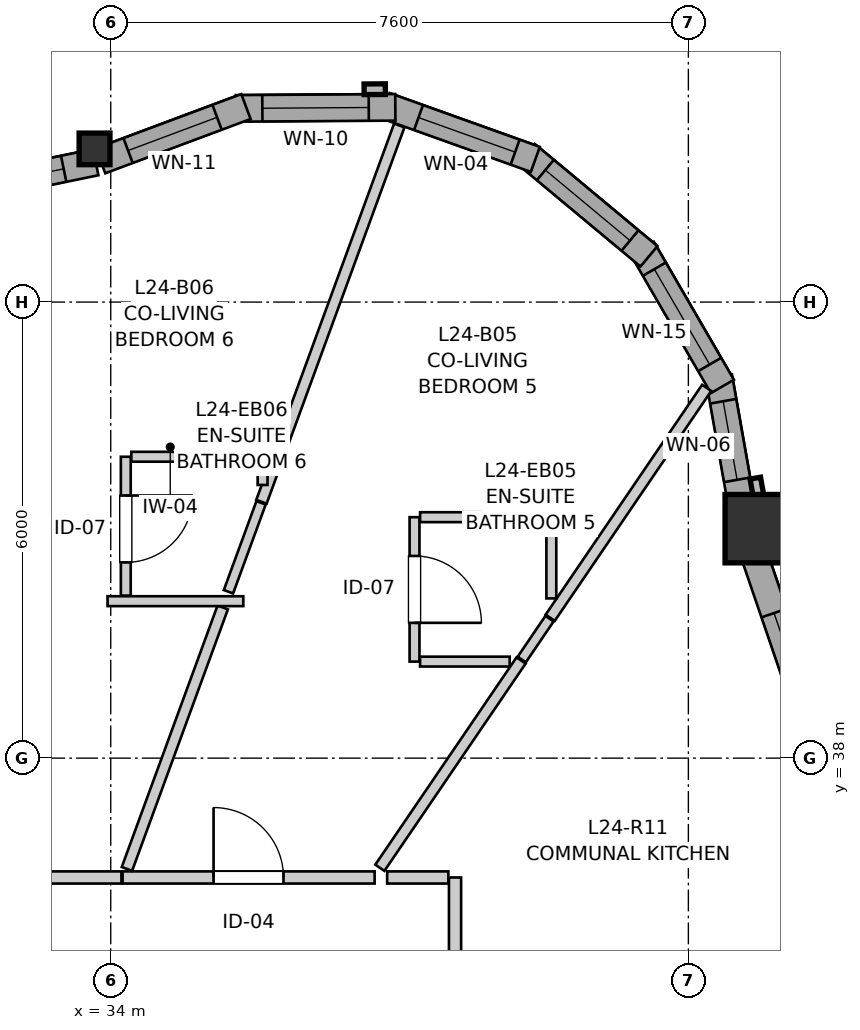
"""IFC4 building model, lengths in metres.
Left out: names, types, materials, properties, quantities, classifications, styles, units other than length and angle.
Written with IfcOpenShell. Run it as: python <this file> out.ifc"""

import sys

from ifc_helpers import new_model, si_unit, direction, frame, frame_2d, origin, origin_2d, place, context, subcontext, project, spatial, rectangle, i_section, extrude, source, transform, mapped, element, fill, save


model = new_model("IFC4")
c1 = context("Model", 3, precision=1e-05, world=origin(), true_north=direction((0.0, 1.0)))
c2 = subcontext(c1, "Body", "Model", "MODEL_VIEW")
j1 = project(units=[si_unit("LENGTHUNIT", "METRE"), si_unit("PLANEANGLEUNIT", "RADIAN")], contexts=[c1])
p1 = place(None, origin())
s1 = spatial("IfcSite", under=j1, at=p1, CompositionType="ELEMENT")
p2 = place(p1, origin())
s2 = spatial("IfcBuilding", under=s1, at=p2, CompositionType="ELEMENT")
p3 = place(p2, frame((0.0, 0.0, 83.2)))
s3 = spatial("IfcBuildingStorey", under=s2, at=p3, CompositionType="ELEMENT", Elevation=83.2)
m1 = source(origin(), c2, "Body", "SweptSolid", [
    extrude(rectangle(XDim=0.9, YDim=0.9, at=origin_2d()), origin(), (0.0, 0.0, 1.0), 2.935),
])
p4 = place(p3, frame((42.532, 41.019, 0.0), z_axis=(0.0, 0.0, 1.0), x_axis=(1.0, 0.0, 0.0)))
e1 = element("IfcColumn", 1, at=p4, inside=s3, PredefinedType="COLUMN", context=c2, shape_type="MappedRepresentation", body=[
    mapped(m1, transform((0.0, 0.0, 0.0), x_axis=(1.0, 0.0, 0.0), y_axis=(0.0, 1.0, 0.0), z_axis=(0.0, 0.0, 1.0), scale=1.0)),
])
m2 = source(origin(), c2, "Body", "SweptSolid", [
    extrude(i_section(OverallWidth=0.406, OverallDepth=0.416, WebThickness=0.027, FlangeThickness=0.044, FilletRadius=0.015, at=origin_2d()), origin(), (0.0, 0.0, 1.0), 2.935),
])
p5 = place(p3, frame((33.787, 46.015, 0.0), z_axis=(0.0, 0.0, 1.0), x_axis=(1.0, 0.0, 0.0)))
e2 = element("IfcColumn", 2, at=p5, inside=s3, PredefinedType="PILASTER", context=c2, shape_type="MappedRepresentation", body=[
    mapped(m2, transform((0.0, 0.0, 0.0), x_axis=(1.0, 0.0, 0.0), y_axis=(0.0, 1.0, 0.0), z_axis=(0.0, 0.0, 1.0), scale=1.0)),
])
p6 = place(p3, frame((43.406, 37.923, 0.0), z_axis=(0.0, 0.0, 1.0), x_axis=(-0.323597196737, 0.946194934601, 0.0)))
e3 = element("IfcWall", 3, at=p6, inside=s3, PredefinedType="SOLIDWALL", context=c2, shape_type="SweptSolid", body=[
    extrude(rectangle(XDim=2.988, YDim=0.35, at=frame_2d((1.494, 0.0))), origin(), (0.0, 0.0, 1.0), 2.465),
])
p7 = place(p6, frame((0.899, 0.0, 0.82)))
e4 = element("IfcOpeningElement", 4, at=p7, cuts=e3, PredefinedType="OPENING", context=c2, shape_type="SweptSolid", body=[
    extrude(rectangle(XDim=1.2, YDim=1.45, at=frame_2d((0.6, 0.725))), frame((0.0, 0.185, 0.0), z_axis=(0.0, -1.0, 0.0), x_axis=(1.0, 0.0, 0.0)), (0.0, 0.0, 1.0), 0.37),
])
p8 = place(p3, frame((42.321, 41.21, 0.0), z_axis=(0.0, 0.0, 1.0), x_axis=(-0.174331490339, 0.984687022092, 0.0)))
e5 = element("IfcWall", 5, at=p8, inside=s3, PredefinedType="SOLIDWALL", context=c2, shape_type="SweptSolid", body=[
    extrude(rectangle(XDim=1.836, YDim=0.35, at=frame_2d((0.918, 0.0))), origin(), (0.0, 0.0, 1.0), 2.465),
])
p9 = place(p8, frame((0.458, 0.0, 0.82)))
e6 = element("IfcOpeningElement", 6, at=p9, cuts=e5, PredefinedType="OPENING", context=c2, shape_type="SweptSolid", body=[
    extrude(rectangle(XDim=1.05, YDim=1.45, at=frame_2d((0.525, 0.725))), frame((0.0, 0.185, 0.0), z_axis=(0.0, -1.0, 0.0), x_axis=(1.0, 0.0, 0.0)), (0.0, 0.0, 1.0), 0.37),
])
p10 = place(p3, frame((42.047, 42.89, 0.0), z_axis=(0.0, 0.0, 1.0), x_axis=(-0.501902596059, 0.864924149315, 0.0)))
e7 = element("IfcWall", 7, at=p10, inside=s3, PredefinedType="SOLIDWALL", context=c2, shape_type="SweptSolid", body=[
    extrude(rectangle(XDim=2.099, YDim=0.35, at=frame_2d((1.049, 0.0))), origin(), (0.0, 0.0, 1.0), 2.465),
])
p11 = place(p10, frame((0.333, 0.0, 0.82)))
e8 = element("IfcOpeningElement", 8, at=p11, cuts=e7, PredefinedType="OPENING", context=c2, shape_type="SweptSolid", body=[
    extrude(rectangle(XDim=1.45, YDim=1.25, at=frame_2d((0.725, 0.625))), frame((0.0, 0.185, 0.0), z_axis=(0.0, -1.0, 0.0), x_axis=(1.0, 0.0, 0.0)), (0.0, 0.0, 1.0), 0.37),
])
p12 = place(p3, frame((41.082, 44.602, 0.0), z_axis=(0.0, 0.0, 1.0), x_axis=(-0.768497696041, 0.639852554249, 0.0)))
e9 = element("IfcWall", 9, at=p12, inside=s3, PredefinedType="SOLIDWALL", context=c2, shape_type="SweptSolid", body=[
    extrude(rectangle(XDim=2.099, YDim=0.35, at=frame_2d((1.049, 0.0))), origin(), (0.0, 0.0, 1.0), 2.465),
])
p13 = place(p12, frame((0.324, 0.0, 0.82)))
e10 = element("IfcOpeningElement", 10, at=p13, cuts=e9, PredefinedType="OPENING", context=c2, shape_type="SweptSolid", body=[
    extrude(rectangle(XDim=1.45, YDim=1.25, at=frame_2d((0.725, 0.625))), frame((0.0, 0.185, 0.0), z_axis=(0.0, -1.0, 0.0), x_axis=(1.0, 0.0, 0.0)), (0.0, 0.0, 1.0), 0.37),
])
p14 = place(p3, frame((39.586, 45.877, 0.0), z_axis=(0.0, 0.0, 1.0), x_axis=(-0.941473186867, 0.33708787936, 0.0)))
e11 = element("IfcWall", 11, at=p14, inside=s3, PredefinedType="SOLIDWALL", context=c2, shape_type="SweptSolid", body=[
    extrude(rectangle(XDim=2.099, YDim=0.35, at=frame_2d((1.049, 0.0))), origin(), (0.0, 0.0, 1.0), 2.465),
])
p15 = place(p14, frame((0.283, 0.0, 0.82)))
e12 = element("IfcOpeningElement", 12, at=p15, cuts=e11, PredefinedType="OPENING", context=c2, shape_type="SweptSolid", body=[
    extrude(rectangle(XDim=1.35, YDim=1.45, at=frame_2d((0.675, 0.725))), frame((0.0, 0.185, 0.0), z_axis=(0.0, -1.0, 0.0), x_axis=(1.0, 0.0, 0.0)), (0.0, 0.0, 1.0), 0.37),
])
p16 = place(p3, frame((37.744, 46.562, 0.0), z_axis=(0.0, 0.0, 1.0), x_axis=(-0.999976451414, -0.006862697526, 0.0)))
e13 = element("IfcWall", 13, at=p16, inside=s3, PredefinedType="SOLIDWALL", context=c2, shape_type="SweptSolid", body=[
    extrude(rectangle(XDim=2.099, YDim=0.35, at=frame_2d((1.049, 0.0))), origin(), (0.0, 0.0, 1.0), 2.465),
])
p17 = place(p16, frame((0.35, 0.0, 0.82)))
e14 = element("IfcOpeningElement", 14, at=p17, cuts=e13, PredefinedType="OPENING", context=c2, shape_type="SweptSolid", body=[
    extrude(rectangle(XDim=1.4, YDim=1.35, at=frame_2d((0.7, 0.675))), frame((0.0, 0.185, 0.0), z_axis=(0.0, -1.0, 0.0), x_axis=(1.0, 0.0, 0.0)), (0.0, 0.0, 1.0), 0.37),
])
p18 = place(p3, frame((35.779, 46.573, 0.0), z_axis=(0.0, 0.0, 1.0), x_axis=(-0.9368002254, -0.349864741994, 0.0)))
e15 = element("IfcWall", 15, at=p18, inside=s3, PredefinedType="SOLIDWALL", context=c2, shape_type="SweptSolid", body=[
    extrude(rectangle(XDim=2.041, YDim=0.35, at=frame_2d((1.021, 0.0))), origin(), (0.0, 0.0, 1.0), 2.465),
])
p19 = place(p18, frame((0.406, 0.0, 0.82)))
e16 = element("IfcOpeningElement", 16, at=p19, cuts=e15, PredefinedType="OPENING", context=c2, shape_type="SweptSolid", body=[
    extrude(rectangle(XDim=1.25, YDim=1.35, at=frame_2d((0.625, 0.675))), frame((0.0, 0.185, 0.0), z_axis=(0.0, -1.0, 0.0), x_axis=(1.0, 0.0, 0.0)), (0.0, 0.0, 1.0), 0.37),
])
p20 = place(p3, frame((33.803, 45.84, 0.0), z_axis=(0.0, 0.0, 1.0), x_axis=(-0.97943222174, -0.201773444777, 0.0)))
e17 = element("IfcWall", 17, at=p20, inside=s3, PredefinedType="SOLIDWALL", context=c2, shape_type="SweptSolid", body=[
    extrude(rectangle(XDim=3.144, YDim=0.35, at=frame_2d((1.572, 0.0))), origin(), (0.0, 0.0, 1.0), 2.465),
])
p21 = place(p20, frame((0.431, 0.0, 0.82)))
e18 = element("IfcOpeningElement", 18, at=p21, cuts=e17, PredefinedType="OPENING", context=c2, shape_type="SweptSolid", body=[
    extrude(rectangle(XDim=0.95, YDim=1.35, at=frame_2d((0.475, 0.675))), frame((0.0, 0.185, 0.0), z_axis=(0.0, -1.0, 0.0), x_axis=(1.0, 0.0, 0.0)), (0.0, 0.0, 1.0), 0.37),
])
p22 = place(p20, frame((1.933, 0.0, 0.82)))
e19 = element("IfcOpeningElement", 19, at=p22, cuts=e17, PredefinedType="OPENING", context=c2, shape_type="SweptSolid", body=[
    extrude(rectangle(XDim=0.95, YDim=1.35, at=frame_2d((0.475, 0.675))), frame((0.0, 0.185, 0.0), z_axis=(0.0, -1.0, 0.0), x_axis=(1.0, 0.0, 0.0)), (0.0, 0.0, 1.0), 0.37),
])
p23 = place(p3, frame((38.53, 36.43, 0.0), z_axis=(0.0, 0.0, 1.0), x_axis=(0.0, -1.0, 0.0)))
e20 = element("IfcWall", 20, at=p23, inside=s3, PredefinedType="PARTITIONING", context=c2, shape_type="SweptSolid", body=[
    extrude(rectangle(XDim=4.559, YDim=0.16, at=frame_2d((2.279, 0.0))), origin(), (0.0, 0.0, 1.0), 2.573),
])
p24 = place(p23, frame((1.646, 0.0, 0.0)))
e21 = element("IfcOpeningElement", 21, at=p24, cuts=e20, PredefinedType="OPENING", context=c2, shape_type="SweptSolid", body=[
    extrude(rectangle(XDim=1.3, YDim=2.1, at=frame_2d((0.65, 1.05))), frame((0.0, 0.09, 0.0), z_axis=(0.0, -1.0, 0.0), x_axis=(1.0, 0.0, 0.0)), (0.0, 0.0, 1.0), 0.18),
])
p25 = place(p3, frame((34.156, 36.43, 0.0), z_axis=(0.0, 0.0, 1.0), x_axis=(1.0, 0.0, 0.0)))
e22 = element("IfcWall", 22, at=p25, inside=s3, PredefinedType="PARTITIONING", context=c2, shape_type="SweptSolid", body=[
    extrude(rectangle(XDim=3.316, YDim=0.16, at=frame_2d((1.658, 0.0))), origin(), (0.0, 0.0, 1.0), 2.935),
])
p26 = place(p25, frame((1.197, 0.0, 0.0)))
e23 = element("IfcOpeningElement", 23, at=p26, cuts=e22, PredefinedType="OPENING", context=c2, shape_type="SweptSolid", body=[
    extrude(rectangle(XDim=0.92, YDim=2.1, at=frame_2d((0.46, 1.05))), frame((0.0, 0.09, 0.0), z_axis=(0.0, -1.0, 0.0), x_axis=(1.0, 0.0, 0.0)), (0.0, 0.0, 1.0), 0.18),
])
p27 = place(p3, frame((31.335, 36.43, 0.0), z_axis=(0.0, 0.0, 1.0), x_axis=(1.0, 0.0, 0.0)))
e24 = element("IfcWall", 24, at=p27, inside=s3, PredefinedType="PARTITIONING", context=c2, shape_type="SweptSolid", body=[
    extrude(rectangle(XDim=2.806, YDim=0.16, at=frame_2d((1.403, 0.0))), origin(), (0.0, 0.0, 1.0), 2.935),
])
p28 = place(p27, frame((0.944, 0.0, 0.0)))
e25 = element("IfcOpeningElement", 25, at=p28, cuts=e24, PredefinedType="OPENING", context=c2, shape_type="SweptSolid", body=[
    extrude(rectangle(XDim=0.92, YDim=2.1, at=frame_2d((0.46, 1.05))), frame((0.0, 0.09, 0.0), z_axis=(0.0, -1.0, 0.0), x_axis=(1.0, 0.0, 0.0)), (0.0, 0.0, 1.0), 0.18),
])
p29 = place(p3, frame((34.198, 41.965, 0.0), z_axis=(0.0, 0.0, 1.0), x_axis=(0.0, -1.0, 0.0)))
e26 = element("IfcWall", 26, at=p29, inside=s3, PredefinedType="PARTITIONING", context=c2, shape_type="SweptSolid", body=[
    extrude(rectangle(XDim=1.827, YDim=0.13, at=frame_2d((0.914, 0.0))), origin(), (0.0, 0.0, 1.0), 2.935),
])
p30 = place(p29, frame((0.51, 0.0, 0.0)))
e27 = element("IfcOpeningElement", 27, at=p30, cuts=e26, PredefinedType="OPENING", context=c2, shape_type="SweptSolid", body=[
    extrude(rectangle(XDim=0.88, YDim=2.05, at=frame_2d((0.44, 1.025))), frame((0.0, 0.075, 0.0), z_axis=(0.0, -1.0, 0.0), x_axis=(1.0, 0.0, 0.0)), (0.0, 0.0, 1.0), 0.15),
])
p31 = place(p3, frame((37.997, 41.17, 0.0), z_axis=(0.0, 0.0, 1.0), x_axis=(0.0, -1.0, 0.0)))
e28 = element("IfcWall", 28, at=p31, inside=s3, PredefinedType="PARTITIONING", context=c2, shape_type="SweptSolid", body=[
    extrude(rectangle(XDim=1.9, YDim=0.13, at=frame_2d((0.95, 0.0))), origin(), (0.0, 0.0, 1.0), 2.935),
])
p32 = place(p31, frame((0.51, 0.0, 0.0)))
e29 = element("IfcOpeningElement", 29, at=p32, cuts=e28, PredefinedType="OPENING", context=c2, shape_type="SweptSolid", body=[
    extrude(rectangle(XDim=0.88, YDim=2.05, at=frame_2d((0.44, 1.025))), frame((0.0, 0.075, 0.0), z_axis=(0.0, -1.0, 0.0), x_axis=(1.0, 0.0, 0.0)), (0.0, 0.0, 1.0), 0.15),
])
p33 = place(p3, frame((38.659, 31.93, 0.0), z_axis=(0.0, 0.0, 1.0), x_axis=(0.813936175568, 0.580954302938, 0.0)))
e30 = element("IfcWall", 30, at=p33, inside=s3, PredefinedType="PARTITIONING", context=c2, shape_type="SweptSolid", body=[
    extrude(rectangle(XDim=6.346, YDim=0.145, at=frame_2d((3.173, 0.0))), origin(), (0.0, 0.0, 1.0), 2.935),
])
p34 = place(p3, frame((35.983, 41.373, 0.0), z_axis=(0.0, 0.0, 1.0), x_axis=(0.343972978133, 0.938979547335, 0.0)))
e31 = element("IfcWall", 31, at=p34, inside=s3, PredefinedType="PARTITIONING", context=c2, shape_type="SweptSolid", body=[
    extrude(rectangle(XDim=5.272, YDim=0.145, at=frame_2d((2.636, 0.0))), origin(), (0.0, 0.0, 1.0), 2.935),
])
p35 = place(p3, frame((34.213, 36.542, 0.0), z_axis=(0.0, 0.0, 1.0), x_axis=(0.343978558693, 0.93897750301, 0.0)))
e32 = element("IfcWall", 32, at=p35, inside=s3, PredefinedType="PARTITIONING", context=c2, shape_type="SweptSolid", body=[
    extrude(rectangle(XDim=3.664, YDim=0.145, at=frame_2d((1.832, 0.0))), origin(), (0.0, 0.0, 1.0), 2.935),
])
p36 = place(p3, frame((39.782, 39.847, 0.0), z_axis=(0.0, 0.0, 1.0), x_axis=(0.562744405359, 0.826630954077, 0.0)))
e33 = element("IfcWall", 33, at=p36, inside=s3, PredefinedType="PARTITIONING", context=c2, shape_type="SweptSolid", body=[
    extrude(rectangle(XDim=3.658, YDim=0.145, at=frame_2d((1.829, 0.0))), origin(), (0.0, 0.0, 1.0), 2.935),
])
p37 = place(p3, frame((37.541, 36.557, 0.0), z_axis=(0.0, 0.0, 1.0), x_axis=(0.563020017907, 0.826443258449, 0.0)))
e34 = element("IfcWall", 34, at=p37, inside=s3, PredefinedType="PARTITIONING", context=c2, shape_type="SweptSolid", body=[
    extrude(rectangle(XDim=3.3, YDim=0.145, at=frame_2d((1.65, 0.0))), origin(), (0.0, 0.0, 1.0), 2.935),
])
p38 = place(p3, frame((38.07, 41.17, 0.0), z_axis=(0.0, 0.0, 1.0), x_axis=(1.0, 0.0, 0.0)))
e35 = element("IfcWall", 35, at=p38, inside=s3, PredefinedType="PARTITIONING", context=c2, shape_type="SweptSolid", body=[
    extrude(rectangle(XDim=1.727, YDim=0.13, at=frame_2d((0.864, 0.0))), origin(), (0.0, 0.0, 1.0), 2.935),
])
p39 = place(p3, frame((34.271, 41.965, 0.0), z_axis=(0.0, 0.0, 1.0), x_axis=(1.0, 0.0, 0.0)))
e36 = element("IfcWall", 36, at=p39, inside=s3, PredefinedType="PARTITIONING", context=c2, shape_type="SweptSolid", body=[
    extrude(rectangle(XDim=1.727, YDim=0.13, at=frame_2d((0.864, 0.0))), origin(), (0.0, 0.0, 1.0), 2.103),
])
p40 = place(p3, frame((38.07, 39.27, 0.0), z_axis=(0.0, 0.0, 1.0), x_axis=(1.0, 0.0, 0.0)))
e37 = element("IfcWall", 37, at=p40, inside=s3, PredefinedType="PARTITIONING", context=c2, shape_type="SweptSolid", body=[
    extrude(rectangle(XDim=1.179, YDim=0.13, at=frame_2d((0.589, 0.0))), origin(), (0.0, 0.0, 1.0), 2.935),
])
p41 = place(p3, frame((35.549, 40.189, 0.0), z_axis=(0.0, 0.0, 1.0), x_axis=(0.344070409158, 0.938943850048, 0.0)))
e38 = element("IfcWall", 38, at=p41, inside=s3, PredefinedType="PARTITIONING", context=c2, shape_type="SweptSolid", body=[
    extrude(rectangle(XDim=1.246, YDim=0.13, at=frame_2d((0.623, 0.0))), origin(), (0.0, 0.0, 1.0), 2.935),
])
p42 = place(p3, frame((33.958, 40.065, 0.0), z_axis=(0.0, 0.0, 1.0), x_axis=(1.0, 0.0, 0.0)))
e39 = element("IfcWall", 39, at=p42, inside=s3, PredefinedType="PARTITIONING", context=c2, shape_type="SweptSolid", body=[
    extrude(rectangle(XDim=1.786, YDim=0.13, at=frame_2d((0.893, 0.0))), origin(), (0.0, 0.0, 1.0), 2.935),
])
p43 = place(p3, frame((39.797, 40.101, 0.0), z_axis=(0.0, 0.0, 1.0), x_axis=(0.0, 1.0, 0.0)))
e40 = element("IfcWall", 40, at=p43, inside=s3, PredefinedType="PARTITIONING", context=c2, shape_type="SweptSolid", body=[
    extrude(rectangle(XDim=0.996, YDim=0.13, at=frame_2d((0.498, 0.0))), origin(), (0.0, 0.0, 1.0), 2.935),
])
p44 = place(p3, frame((37.637, 36.43, 0.0), z_axis=(0.0, 0.0, 1.0), x_axis=(1.0, 0.0, 0.0)))
e41 = element("IfcWall", 41, at=p44, inside=s3, PredefinedType="PARTITIONING", context=c2, shape_type="SweptSolid", body=[
    extrude(rectangle(XDim=0.805, YDim=0.16, at=frame_2d((0.402, 0.0))), origin(), (0.0, 0.0, 1.0), 2.935),
])
p45 = place(p3, frame((39.408, 39.297, 0.0), z_axis=(0.0, 0.0, 1.0), x_axis=(0.562042989861, 0.827108020483, 0.0)))
e42 = element("IfcWall", 42, at=p45, inside=s3, PredefinedType="PARTITIONING", context=c2, shape_type="SweptSolid", body=[
    extrude(rectangle(XDim=0.65, YDim=0.13, at=frame_2d((0.325, 0.0))), origin(), (0.0, 0.0, 1.0), 2.935),
])
p46 = place(p3, frame((35.998, 41.594, 0.0), z_axis=(0.0, 0.0, 1.0), x_axis=(0.0, 1.0, 0.0)))
e43 = element("IfcWall", 43, at=p46, inside=s3, PredefinedType="PARTITIONING", context=c2, shape_type="SweptSolid", body=[
    extrude(rectangle(XDim=0.371, YDim=0.13, at=frame_2d((0.186, 0.0))), origin(), (0.0, 0.0, 1.0), 2.935),
])
m3 = source(origin(), c2, "Body", "SweptSolid", [
    extrude(rectangle(XDim=1.2, YDim=1.45, at=frame_2d((0.6, 0.725))), frame((0.0, 0.03, 0.0), z_axis=(0.0, -1.0, 0.0), x_axis=(1.0, 0.0, 0.0)), (0.0, 0.0, 1.0), 0.06),
])
p47 = place(p7, origin())
e44 = element("IfcWindow", 44, at=p47, inside=s3, PartitioningType="SINGLE_PANEL", PredefinedType="WINDOW", context=c2, shape_type="MappedRepresentation", body=[
    mapped(m3, transform((0.0, 0.0, 0.0), x_axis=(1.0, 0.0, 0.0), y_axis=(0.0, 1.0, 0.0), z_axis=(0.0, 0.0, 1.0), scale=1.0)),
])
fill(e4, e44)
m4 = source(origin(), c2, "Body", "SweptSolid", [
    extrude(rectangle(XDim=1.05, YDim=1.45, at=frame_2d((0.525, 0.725))), frame((0.0, 0.03, 0.0), z_axis=(0.0, -1.0, 0.0), x_axis=(1.0, 0.0, 0.0)), (0.0, 0.0, 1.0), 0.06),
])
p48 = place(p9, origin())
e45 = element("IfcWindow", 45, at=p48, inside=s3, PartitioningType="SINGLE_PANEL", PredefinedType="WINDOW", context=c2, shape_type="MappedRepresentation", body=[
    mapped(m4, transform((0.0, 0.0, 0.0), x_axis=(1.0, 0.0, 0.0), y_axis=(0.0, 1.0, 0.0), z_axis=(0.0, 0.0, 1.0), scale=1.0)),
])
fill(e6, e45)
m5 = source(origin(), c2, "Body", "SweptSolid", [
    extrude(rectangle(XDim=1.45, YDim=1.25, at=frame_2d((0.725, 0.625))), frame((0.0, 0.03, 0.0), z_axis=(0.0, -1.0, 0.0), x_axis=(1.0, 0.0, 0.0)), (0.0, 0.0, 1.0), 0.06),
])
p49 = place(p11, origin())
e46 = element("IfcWindow", 46, at=p49, inside=s3, PartitioningType="SINGLE_PANEL", PredefinedType="WINDOW", context=c2, shape_type="MappedRepresentation", body=[
    mapped(m5, transform((0.0, 0.0, 0.0), x_axis=(1.0, 0.0, 0.0), y_axis=(0.0, 1.0, 0.0), z_axis=(0.0, 0.0, 1.0), scale=1.0)),
])
fill(e8, e46)
p50 = place(p13, origin())
e47 = element("IfcWindow", 47, at=p50, inside=s3, PartitioningType="SINGLE_PANEL", PredefinedType="WINDOW", context=c2, shape_type="MappedRepresentation", body=[
    mapped(m5, transform((0.0, 0.0, 0.0), x_axis=(1.0, 0.0, 0.0), y_axis=(0.0, 1.0, 0.0), z_axis=(0.0, 0.0, 1.0), scale=1.0)),
])
fill(e10, e47)
m6 = source(origin(), c2, "Body", "SweptSolid", [
    extrude(rectangle(XDim=1.35, YDim=1.45, at=frame_2d((0.675, 0.725))), frame((0.0, 0.03, 0.0), z_axis=(0.0, -1.0, 0.0), x_axis=(1.0, 0.0, 0.0)), (0.0, 0.0, 1.0), 0.06),
])
p51 = place(p15, origin())
e48 = element("IfcWindow", 48, at=p51, inside=s3, PartitioningType="SINGLE_PANEL", PredefinedType="WINDOW", context=c2, shape_type="MappedRepresentation", body=[
    mapped(m6, transform((0.0, 0.0, 0.0), x_axis=(1.0, 0.0, 0.0), y_axis=(0.0, 1.0, 0.0), z_axis=(0.0, 0.0, 1.0), scale=1.0)),
])
fill(e12, e48)
m7 = source(origin(), c2, "Body", "SweptSolid", [
    extrude(rectangle(XDim=1.4, YDim=1.35, at=frame_2d((0.7, 0.675))), frame((0.0, 0.03, 0.0), z_axis=(0.0, -1.0, 0.0), x_axis=(1.0, 0.0, 0.0)), (0.0, 0.0, 1.0), 0.06),
])
p52 = place(p17, origin())
e49 = element("IfcWindow", 49, at=p52, inside=s3, PartitioningType="SINGLE_PANEL", PredefinedType="WINDOW", context=c2, shape_type="MappedRepresentation", body=[
    mapped(m7, transform((0.0, 0.0, 0.0), x_axis=(1.0, 0.0, 0.0), y_axis=(0.0, 1.0, 0.0), z_axis=(0.0, 0.0, 1.0), scale=1.0)),
])
fill(e14, e49)
m8 = source(origin(), c2, "Body", "SweptSolid", [
    extrude(rectangle(XDim=1.25, YDim=1.35, at=frame_2d((0.625, 0.675))), frame((0.0, 0.03, 0.0), z_axis=(0.0, -1.0, 0.0), x_axis=(1.0, 0.0, 0.0)), (0.0, 0.0, 1.0), 0.06),
])
p53 = place(p19, origin())
e50 = element("IfcWindow", 50, at=p53, inside=s3, PartitioningType="SINGLE_PANEL", PredefinedType="WINDOW", context=c2, shape_type="MappedRepresentation", body=[
    mapped(m8, transform((0.0, 0.0, 0.0), x_axis=(1.0, 0.0, 0.0), y_axis=(0.0, 1.0, 0.0), z_axis=(0.0, 0.0, 1.0), scale=1.0)),
])
fill(e16, e50)
m9 = source(origin(), c2, "Body", "SweptSolid", [
    extrude(rectangle(XDim=0.95, YDim=1.35, at=frame_2d((0.475, 0.675))), frame((0.0, 0.03, 0.0), z_axis=(0.0, -1.0, 0.0), x_axis=(1.0, 0.0, 0.0)), (0.0, 0.0, 1.0), 0.06),
])
p54 = place(p21, origin())
e51 = element("IfcWindow", 51, at=p54, inside=s3, PartitioningType="SINGLE_PANEL", PredefinedType="WINDOW", context=c2, shape_type="MappedRepresentation", body=[
    mapped(m9, transform((0.0, 0.0, 0.0), x_axis=(1.0, 0.0, 0.0), y_axis=(0.0, 1.0, 0.0), z_axis=(0.0, 0.0, 1.0), scale=1.0)),
])
fill(e18, e51)
m10 = source(origin(), c2, "Body", "SweptSolid", [
    extrude(rectangle(XDim=0.92, YDim=2.1, at=frame_2d((0.46, 1.05))), frame((0.0, 0.025, 0.0), z_axis=(0.0, -1.0, 0.0), x_axis=(1.0, 0.0, 0.0)), (0.0, 0.0, 1.0), 0.05),
])
p55 = place(p26, origin())
e52 = element("IfcDoor", 52, at=p55, inside=s3, OperationType="SINGLE_SWING_LEFT", PredefinedType="DOOR", context=c2, shape_type="MappedRepresentation", body=[
    mapped(m10, transform((0.0, 0.0, 0.0), x_axis=(1.0, 0.0, 0.0), y_axis=(0.0, 1.0, 0.0), z_axis=(0.0, 0.0, 1.0), scale=1.0)),
])
fill(e23, e52)
m11 = source(origin(), c2, "Body", "SweptSolid", [
    extrude(rectangle(XDim=0.88, YDim=2.05, at=frame_2d((0.44, 1.025))), frame((0.0, 0.025, 0.0), z_axis=(0.0, -1.0, 0.0), x_axis=(1.0, 0.0, 0.0)), (0.0, 0.0, 1.0), 0.05),
])
p56 = place(p30, origin())
e53 = element("IfcDoor", 53, at=p56, inside=s3, OperationType="SINGLE_SWING_LEFT", PredefinedType="DOOR", context=c2, shape_type="MappedRepresentation", body=[
    mapped(m11, transform((0.0, 0.0, 0.0), x_axis=(1.0, 0.0, 0.0), y_axis=(0.0, 1.0, 0.0), z_axis=(0.0, 0.0, 1.0), scale=1.0)),
])
fill(e27, e53)
p57 = place(p32, origin())
e54 = element("IfcDoor", 54, at=p57, inside=s3, OperationType="SINGLE_SWING_RIGHT", PredefinedType="DOOR", context=c2, shape_type="MappedRepresentation", body=[
    mapped(m11, transform((0.0, 0.0, 0.0), x_axis=(1.0, 0.0, 0.0), y_axis=(0.0, 1.0, 0.0), z_axis=(0.0, 0.0, 1.0), scale=1.0)),
])
fill(e29, e54)
save(model, sys.argv[1])
